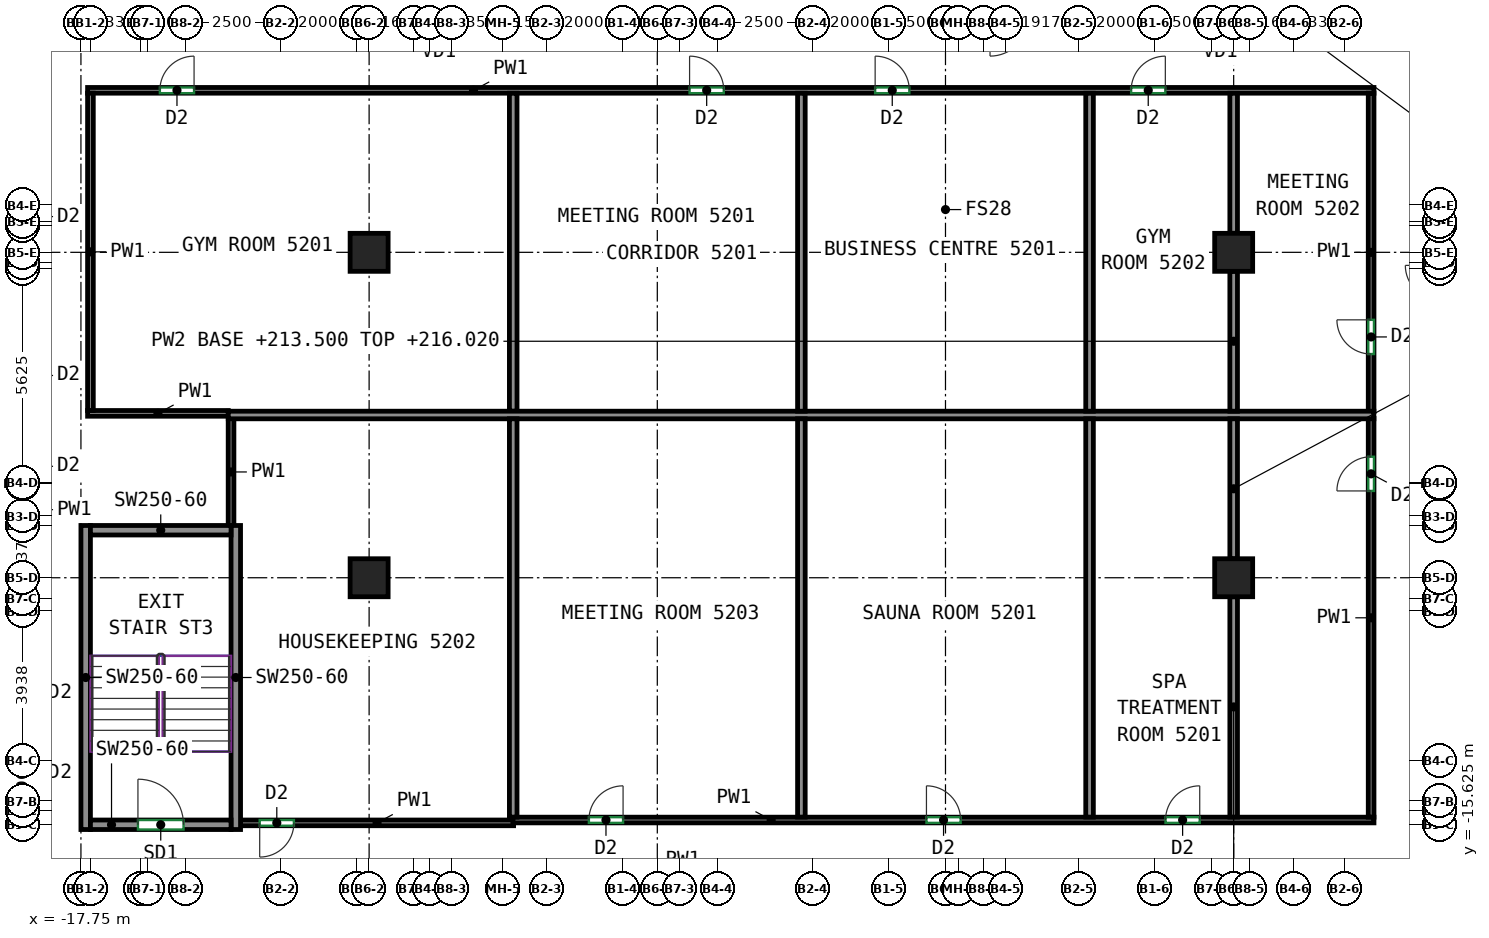
"""IFC4 building model, lengths in metres.
Left out: names, types, materials, properties, quantities, classifications, styles, units other than length and angle.
Written with IfcOpenShell. Run it as: python <this file> out.ifc"""

import sys

from ifc_helpers import new_model, si_unit, direction, frame, frame_2d, origin, origin_2d, place, context, subcontext, project, spatial, rectangle, extrude, source, transform, mapped, element, fill, save


model = new_model("IFC4")
c1 = context("Model", 3, precision=1e-05, world=origin(), true_north=direction((0.0, 1.0)))
c2 = subcontext(c1, "Body", "Model", "MODEL_VIEW")
j1 = project(units=[si_unit("LENGTHUNIT", "METRE"), si_unit("PLANEANGLEUNIT", "RADIAN")], contexts=[c1])
p1 = place(None, origin())
s1 = spatial("IfcSite", under=j1, at=p1, CompositionType="ELEMENT")
p2 = place(p1, origin())
s2 = spatial("IfcBuilding", under=s1, at=p2, CompositionType="ELEMENT")
p3 = place(p2, frame((0.0, 0.0, 213.5)))
s3 = spatial("IfcBuildingStorey", under=s2, at=p3, CompositionType="ELEMENT", Elevation=213.5)
m1 = source(origin(), c2, "Body", "SweptSolid", [
    extrude(rectangle(XDim=1.0, YDim=1.0, at=origin_2d()), origin(), (0.0, 0.0, 1.0), 3.12),
])
for number, where, z_axis, x_axis in (
    (1, (-10.167, -9.125, 0.0), (0.0, 0.0, 1.0), (1.0, 0.0, 0.0)),
    (2, (-10.167, -0.562, 0.0), (0.0, 0.0, 1.0), (1.0, 0.0, 0.0)),
    (3, (12.583, -9.125, 0.0), (0.0, 0.0, 1.0), (1.0, 0.0, 0.0)),
    (4, (12.583, -0.562, 0.0), (0.0, 0.0, 1.0), (1.0, 0.0, 0.0)),
):
    element("IfcColumn", number, at=place(p3, frame(where, z_axis=z_axis, x_axis=x_axis)), inside=s3, PredefinedType="COLUMN", context=c2, shape_type="MappedRepresentation", body=[
        mapped(m1, transform((0.0, 0.0, 0.0))),
    ])
m2 = source(origin(), c2, "Body", "SweptSolid", [
    extrude(rectangle(XDim=8.0, YDim=0.25, at=frame_2d((4.0, 0.0))), origin(), (0.0, 0.0, 1.0), 3.12),
])
for number, where, z_axis, x_axis in (
    (5, (-17.625, -15.75, 0.0), (0.0, 0.0, 1.0), (0.0, 1.0, 0.0)),
    (6, (-13.675, -15.75, 0.0), (0.0, 0.0, 1.0), (0.0, 1.0, 0.0)),
):
    element("IfcWall", number, at=place(p3, frame(where, z_axis=z_axis, x_axis=x_axis)), inside=s3, PredefinedType="SHEAR", context=c2, shape_type="MappedRepresentation", body=[
        mapped(m2, transform((0.0, 0.0, 0.0))),
    ])
m3 = source(origin(), c2, "Body", "SweptSolid", [
    extrude(rectangle(XDim=3.7, YDim=0.25, at=frame_2d((1.85, 0.0))), origin(), (0.0, 0.0, 1.0), 3.12),
])
p4 = place(p3, frame((-17.5, -15.625, 0.0), z_axis=(0.0, 0.0, 1.0), x_axis=(1.0, 0.0, 0.0)))
e7 = element("IfcWall", 7, at=p4, inside=s3, PredefinedType="SHEAR", context=c2, shape_type="MappedRepresentation", body=[
    mapped(m3, transform((0.0, 0.0, 0.0))),
])
p5 = place(p4, frame((1.25, 0.0, 0.0)))
e8 = element("IfcOpeningElement", 8, at=p5, cuts=e7, PredefinedType="OPENING", context=c2, shape_type="SweptSolid", body=[
    extrude(rectangle(XDim=1.2, YDim=2.1, at=frame_2d((0.6, 1.05))), frame((0.0, 0.135, 0.0), z_axis=(0.0, -1.0, 0.0), x_axis=(1.0, 0.0, 0.0)), (0.0, 0.0, 1.0), 0.27),
])
p6 = place(p3, frame((-17.5, -7.875, 0.0), z_axis=(0.0, 0.0, 1.0), x_axis=(1.0, 0.0, 0.0)))
e9 = element("IfcWall", 9, at=p6, inside=s3, PredefinedType="SHEAR", context=c2, shape_type="MappedRepresentation", body=[
    mapped(m3, transform((0.0, 0.0, 0.0))),
])
p7 = place(p3, frame((-17.575, -4.8, 0.0), z_axis=(0.0, 0.0, 1.0), x_axis=(1.0, 0.0, 0.0)))
e10 = element("IfcWall", 10, at=p7, inside=s3, PredefinedType="PARTITIONING", context=c2, shape_type="SweptSolid", body=[
    extrude(rectangle(XDim=3.702, YDim=0.15, at=frame_2d((1.851, 0.0))), origin(), (0.0, 0.0, 1.0), 3.12),
])
p8 = place(p3, frame((-17.575, 3.7, 0.0), z_axis=(0.0, 0.0, 1.0), x_axis=(1.0, 0.0, 0.0)))
e11 = element("IfcWall", 11, at=p8, inside=s3, PredefinedType="PARTITIONING", context=c2, shape_type="SweptSolid", body=[
    extrude(rectangle(XDim=33.85, YDim=0.15, at=frame_2d((16.925, 0.0))), origin(), (0.0, 0.0, 1.0), 3.12),
])
p9 = place(p8, frame((1.902, 0.0, 0.0)))
e12 = element("IfcOpeningElement", 12, at=p9, cuts=e11, PredefinedType="OPENING", context=c2, shape_type="SweptSolid", body=[
    extrude(rectangle(XDim=0.9, YDim=2.1, at=frame_2d((0.45, 1.05))), frame((0.0, 0.085, 0.0), z_axis=(0.0, -1.0, 0.0), x_axis=(1.0, 0.0, 0.0)), (0.0, 0.0, 1.0), 0.17),
])
p10 = place(p8, frame((15.841, 0.0, 0.0)))
e13 = element("IfcOpeningElement", 13, at=p10, cuts=e11, PredefinedType="OPENING", context=c2, shape_type="SweptSolid", body=[
    extrude(rectangle(XDim=0.9, YDim=2.1, at=frame_2d((0.45, 1.05))), frame((0.0, 0.085, 0.0), z_axis=(0.0, -1.0, 0.0), x_axis=(1.0, 0.0, 0.0)), (0.0, 0.0, 1.0), 0.17),
])
p11 = place(p8, frame((20.724, 0.0, 0.0)))
e14 = element("IfcOpeningElement", 14, at=p11, cuts=e11, PredefinedType="OPENING", context=c2, shape_type="SweptSolid", body=[
    extrude(rectangle(XDim=0.9, YDim=2.1, at=frame_2d((0.45, 1.05))), frame((0.0, 0.085, 0.0), z_axis=(0.0, -1.0, 0.0), x_axis=(1.0, 0.0, 0.0)), (0.0, 0.0, 1.0), 0.17),
])
p12 = place(p8, frame((27.46, 0.0, 0.0)))
e15 = element("IfcOpeningElement", 15, at=p12, cuts=e11, PredefinedType="OPENING", context=c2, shape_type="SweptSolid", body=[
    extrude(rectangle(XDim=0.9, YDim=2.1, at=frame_2d((0.45, 1.05))), frame((0.0, 0.085, 0.0), z_axis=(0.0, -1.0, 0.0), x_axis=(1.0, 0.0, 0.0)), (0.0, 0.0, 1.0), 0.17),
])
p13 = place(p3, frame((-17.5, -4.725, 0.0), z_axis=(0.0, 0.0, 1.0), x_axis=(0.0, 1.0, 0.0)))
e16 = element("IfcWall", 16, at=p13, inside=s3, PredefinedType="PARTITIONING", context=c2, shape_type="SweptSolid", body=[
    extrude(rectangle(XDim=8.35, YDim=0.15, at=frame_2d((4.175, 0.0))), origin(), (0.0, 0.0, 1.0), 3.12),
])
p14 = place(p3, frame((16.2, -4.753, 0.0), z_axis=(0.0, 0.0, 1.0), x_axis=(0.0, 1.0, 0.0)))
e17 = element("IfcWall", 17, at=p14, inside=s3, PredefinedType="PARTITIONING", context=c2, shape_type="SweptSolid", body=[
    extrude(rectangle(XDim=8.378, YDim=0.15, at=frame_2d((4.189, 0.0))), origin(), (0.0, 0.0, 1.0), 3.12),
])
p15 = place(p14, frame((1.514, 0.0, 0.0)))
e18 = element("IfcOpeningElement", 18, at=p15, cuts=e17, PredefinedType="OPENING", context=c2, shape_type="SweptSolid", body=[
    extrude(rectangle(XDim=0.9, YDim=2.1, at=frame_2d((0.45, 1.05))), frame((0.0, 0.085, 0.0), z_axis=(0.0, -1.0, 0.0), x_axis=(1.0, 0.0, 0.0)), (0.0, 0.0, 1.0), 0.17),
])
p16 = place(p3, frame((-13.8, -7.75, 0.0), z_axis=(0.0, 0.0, 1.0), x_axis=(0.0, 1.0, 0.0)))
e19 = element("IfcWall", 19, at=p16, inside=s3, PredefinedType="PARTITIONING", context=c2, shape_type="SweptSolid", body=[
    extrude(rectangle(XDim=2.817, YDim=0.15, at=frame_2d((1.408, 0.0))), origin(), (0.0, 0.0, 1.0), 3.12),
])
p17 = place(p3, frame((-6.365, -15.575, 0.0), z_axis=(0.0, 0.0, 1.0), x_axis=(-1.0, 0.0, 0.0)))
e20 = element("IfcWall", 20, at=p17, inside=s3, PredefinedType="PARTITIONING", context=c2, shape_type="SweptSolid", body=[
    extrude(rectangle(XDim=7.185, YDim=0.15, at=frame_2d((3.593, 0.0))), origin(), (0.0, 0.0, 1.0), 3.12),
])
p18 = place(p17, frame((5.781, 0.0, 0.0)))
e21 = element("IfcOpeningElement", 21, at=p18, cuts=e20, PredefinedType="OPENING", context=c2, shape_type="SweptSolid", body=[
    extrude(rectangle(XDim=0.9, YDim=2.1, at=frame_2d((0.45, 1.05))), frame((0.0, 0.085, 0.0), z_axis=(0.0, -1.0, 0.0), x_axis=(1.0, 0.0, 0.0)), (0.0, 0.0, 1.0), 0.17),
])
p19 = place(p3, frame((-6.385, -15.5, 0.0), z_axis=(0.0, 0.0, 1.0), x_axis=(1.0, 0.0, 0.0)))
e22 = element("IfcWall", 22, at=p19, inside=s3, PredefinedType="PARTITIONING", context=c2, shape_type="SweptSolid", body=[
    extrude(rectangle(XDim=22.66, YDim=0.15, at=frame_2d((11.33, 0.0))), origin(), (0.0, 0.0, 1.0), 3.12),
])
p20 = place(p19, frame((2.001, 0.0, 0.0)))
e23 = element("IfcOpeningElement", 23, at=p20, cuts=e22, PredefinedType="OPENING", context=c2, shape_type="SweptSolid", body=[
    extrude(rectangle(XDim=0.9, YDim=2.1, at=frame_2d((0.45, 1.05))), frame((0.0, 0.085, 0.0), z_axis=(0.0, -1.0, 0.0), x_axis=(1.0, 0.0, 0.0)), (0.0, 0.0, 1.0), 0.17),
])
p21 = place(p19, frame((10.884, 0.0, 0.0)))
e24 = element("IfcOpeningElement", 24, at=p21, cuts=e22, PredefinedType="OPENING", context=c2, shape_type="SweptSolid", body=[
    extrude(rectangle(XDim=0.9, YDim=2.1, at=frame_2d((0.45, 1.05))), frame((0.0, 0.085, 0.0), z_axis=(0.0, -1.0, 0.0), x_axis=(1.0, 0.0, 0.0)), (0.0, 0.0, 1.0), 0.17),
])
p22 = place(p19, frame((17.175, 0.0, 0.0)))
e25 = element("IfcOpeningElement", 25, at=p22, cuts=e22, PredefinedType="OPENING", context=c2, shape_type="SweptSolid", body=[
    extrude(rectangle(XDim=0.9, YDim=2.1, at=frame_2d((0.45, 1.05))), frame((0.0, 0.085, 0.0), z_axis=(0.0, -1.0, 0.0), x_axis=(1.0, 0.0, 0.0)), (0.0, 0.0, 1.0), 0.17),
])
p23 = place(p3, frame((16.2, -15.425, 0.0), z_axis=(0.0, 0.0, 1.0), x_axis=(0.0, 1.0, 0.0)))
e26 = element("IfcWall", 26, at=p23, inside=s3, PredefinedType="PARTITIONING", context=c2, shape_type="SweptSolid", body=[
    extrude(rectangle(XDim=10.492, YDim=0.15, at=frame_2d((5.246, 0.0))), origin(), (0.0, 0.0, 1.0), 3.12),
])
p24 = place(p23, frame((8.584, 0.0, 0.0)))
e27 = element("IfcOpeningElement", 27, at=p24, cuts=e26, PredefinedType="OPENING", context=c2, shape_type="SweptSolid", body=[
    extrude(rectangle(XDim=0.9, YDim=2.1, at=frame_2d((0.45, 1.05))), frame((0.0, 0.085, 0.0), z_axis=(0.0, -1.0, 0.0), x_axis=(1.0, 0.0, 0.0)), (0.0, 0.0, 1.0), 0.17),
])
p25 = place(p3, frame((-6.375, -4.743, 0.0), z_axis=(0.0, 0.0, 1.0), x_axis=(0.0, 1.0, 0.0)))
e28 = element("IfcWall", 28, at=p25, inside=s3, PredefinedType="PARTITIONING", context=c2, shape_type="SweptSolid", body=[
    extrude(rectangle(XDim=8.366, YDim=0.2, at=frame_2d((4.183, 0.0))), origin(), (0.0, 0.0, 1.0), 3.12),
])
p26 = place(p3, frame((-13.873, -4.843, 0.0), z_axis=(0.0, 0.0, 1.0), x_axis=(1.0, 0.0, 0.0)))
e29 = element("IfcWall", 29, at=p26, inside=s3, PredefinedType="PARTITIONING", context=c2, shape_type="SweptSolid", body=[
    extrude(rectangle(XDim=30.146, YDim=0.2, at=frame_2d((15.073, 0.0))), origin(), (0.0, 0.0, 1.0), 3.12),
])
for number, where, z_axis, x_axis in (
    (30, (1.208, -4.743, 0.0), (0.0, 0.0, 1.0), (0.0, 1.0, 0.0)),
    (31, (8.791, -4.743, 0.0), (0.0, 0.0, 1.0), (0.0, 1.0, 0.0)),
):
    element("IfcWall", number, at=place(p3, frame(where, z_axis=z_axis, x_axis=x_axis)), inside=s3, PredefinedType="PARTITIONING", context=c2, shape_type="SweptSolid", body=[
        extrude(rectangle(XDim=8.366, YDim=0.2, at=frame_2d((4.183, 0.0))), origin(), (0.0, 0.0, 1.0), 3.12),
    ])
p27 = place(p3, frame((12.583, -0.062, 0.0), z_axis=(0.0, 0.0, 1.0), x_axis=(0.0, 1.0, 0.0)))
e32 = element("IfcWall", 32, at=p27, inside=s3, PredefinedType="PARTITIONING", context=c2, shape_type="SweptSolid", body=[
    extrude(rectangle(XDim=3.685, YDim=0.2, at=frame_2d((1.843, 0.0))), origin(), (0.0, 0.0, 1.0), 3.12),
])
p28 = place(p3, frame((12.583, -4.743, 0.0), z_axis=(0.0, 0.0, 1.0), x_axis=(0.0, 1.0, 0.0)))
e33 = element("IfcWall", 33, at=p28, inside=s3, PredefinedType="PARTITIONING", context=c2, shape_type="SweptSolid", body=[
    extrude(rectangle(XDim=3.681, YDim=0.2, at=frame_2d((1.84, 0.0))), origin(), (0.0, 0.0, 1.0), 2.52),
])
for number, where, z_axis, x_axis in (
    (34, (-6.375, -15.423, 0.0), (0.0, 0.0, 1.0), (0.0, 1.0, 0.0)),
    (35, (1.208, -15.423, 0.0), (0.0, 0.0, 1.0), (0.0, 1.0, 0.0)),
    (36, (8.791, -15.423, 0.0), (0.0, 0.0, 1.0), (0.0, 1.0, 0.0)),
):
    element("IfcWall", number, at=place(p3, frame(where, z_axis=z_axis, x_axis=x_axis)), inside=s3, PredefinedType="PARTITIONING", context=c2, shape_type="SweptSolid", body=[
        extrude(rectangle(XDim=10.48, YDim=0.2, at=frame_2d((5.24, 0.0))), origin(), (0.0, 0.0, 1.0), 3.12),
    ])
p29 = place(p3, frame((12.583, -8.625, 0.0), z_axis=(0.0, 0.0, 1.0), x_axis=(0.0, 1.0, 0.0)))
e37 = element("IfcWall", 37, at=p29, inside=s3, PredefinedType="PARTITIONING", context=c2, shape_type="SweptSolid", body=[
    extrude(rectangle(XDim=3.682, YDim=0.2, at=frame_2d((1.841, 0.0))), origin(), (0.0, 0.0, 1.0), 2.52),
])
p30 = place(p3, frame((12.583, -15.423, 0.0), z_axis=(0.0, 0.0, 1.0), x_axis=(0.0, 1.0, 0.0)))
e38 = element("IfcWall", 38, at=p30, inside=s3, PredefinedType="PARTITIONING", context=c2, shape_type="SweptSolid", body=[
    extrude(rectangle(XDim=5.798, YDim=0.2, at=frame_2d((2.899, 0.0))), origin(), (0.0, 0.0, 1.0), 2.52),
])
p31 = place(p5, origin())
e39 = element("IfcDoor", 39, at=p31, inside=s3, OperationType="DOUBLE_DOOR_SINGLE_SWING", PredefinedType="DOOR", context=c2, shape_type="SweptSolid", body=[
    extrude(rectangle(XDim=1.2, YDim=2.1, at=frame_2d((0.6, 1.05))), frame((0.0, 0.025, 0.0), z_axis=(0.0, -1.0, 0.0), x_axis=(1.0, 0.0, 0.0)), (0.0, 0.0, 1.0), 0.05),
])
fill(e8, e39)
p32 = place(p18, origin())
e40 = element("IfcDoor", 40, at=p32, inside=s3, OperationType="SINGLE_SWING_RIGHT", PredefinedType="DOOR", context=c2, shape_type="SweptSolid", body=[
    extrude(rectangle(XDim=0.9, YDim=2.1, at=frame_2d((0.45, 1.05))), frame((0.0, 0.025, 0.0), z_axis=(0.0, -1.0, 0.0), x_axis=(1.0, 0.0, 0.0)), (0.0, 0.0, 1.0), 0.05),
])
fill(e21, e40)
p33 = place(p20, origin())
e41 = element("IfcDoor", 41, at=p33, inside=s3, OperationType="SINGLE_SWING_RIGHT", PredefinedType="DOOR", context=c2, shape_type="SweptSolid", body=[
    extrude(rectangle(XDim=0.9, YDim=2.1, at=frame_2d((0.45, 1.05))), frame((0.0, 0.025, 0.0), z_axis=(0.0, -1.0, 0.0), x_axis=(1.0, 0.0, 0.0)), (0.0, 0.0, 1.0), 0.05),
])
fill(e23, e41)
p34 = place(p21, origin())
e42 = element("IfcDoor", 42, at=p34, inside=s3, OperationType="SINGLE_SWING_LEFT", PredefinedType="DOOR", context=c2, shape_type="SweptSolid", body=[
    extrude(rectangle(XDim=0.9, YDim=2.1, at=frame_2d((0.45, 1.05))), frame((0.0, 0.025, 0.0), z_axis=(0.0, -1.0, 0.0), x_axis=(1.0, 0.0, 0.0)), (0.0, 0.0, 1.0), 0.05),
])
fill(e24, e42)
p35 = place(p22, origin())
e43 = element("IfcDoor", 43, at=p35, inside=s3, OperationType="SINGLE_SWING_RIGHT", PredefinedType="DOOR", context=c2, shape_type="SweptSolid", body=[
    extrude(rectangle(XDim=0.9, YDim=2.1, at=frame_2d((0.45, 1.05))), frame((0.0, 0.025, 0.0), z_axis=(0.0, -1.0, 0.0), x_axis=(1.0, 0.0, 0.0)), (0.0, 0.0, 1.0), 0.05),
])
fill(e25, e43)
p36 = place(p24, origin())
e44 = element("IfcDoor", 44, at=p36, inside=s3, OperationType="SINGLE_SWING_LEFT", PredefinedType="DOOR", context=c2, shape_type="SweptSolid", body=[
    extrude(rectangle(XDim=0.9, YDim=2.1, at=frame_2d((0.45, 1.05))), frame((0.0, 0.025, 0.0), z_axis=(0.0, -1.0, 0.0), x_axis=(1.0, 0.0, 0.0)), (0.0, 0.0, 1.0), 0.05),
])
fill(e27, e44)
p37 = place(p15, origin())
e45 = element("IfcDoor", 45, at=p37, inside=s3, OperationType="SINGLE_SWING_RIGHT", PredefinedType="DOOR", context=c2, shape_type="SweptSolid", body=[
    extrude(rectangle(XDim=0.9, YDim=2.1, at=frame_2d((0.45, 1.05))), frame((0.0, 0.025, 0.0), z_axis=(0.0, -1.0, 0.0), x_axis=(1.0, 0.0, 0.0)), (0.0, 0.0, 1.0), 0.05),
])
fill(e18, e45)
p38 = place(p9, origin())
e46 = element("IfcDoor", 46, at=p38, inside=s3, OperationType="SINGLE_SWING_RIGHT", PredefinedType="DOOR", context=c2, shape_type="SweptSolid", body=[
    extrude(rectangle(XDim=0.9, YDim=2.1, at=frame_2d((0.45, 1.05))), frame((0.0, 0.025, 0.0), z_axis=(0.0, -1.0, 0.0), x_axis=(1.0, 0.0, 0.0)), (0.0, 0.0, 1.0), 0.05),
])
fill(e12, e46)
p39 = place(p10, origin())
e47 = element("IfcDoor", 47, at=p39, inside=s3, OperationType="SINGLE_SWING_LEFT", PredefinedType="DOOR", context=c2, shape_type="SweptSolid", body=[
    extrude(rectangle(XDim=0.9, YDim=2.1, at=frame_2d((0.45, 1.05))), frame((0.0, 0.025, 0.0), z_axis=(0.0, -1.0, 0.0), x_axis=(1.0, 0.0, 0.0)), (0.0, 0.0, 1.0), 0.05),
])
fill(e13, e47)
p40 = place(p11, origin())
e48 = element("IfcDoor", 48, at=p40, inside=s3, OperationType="SINGLE_SWING_LEFT", PredefinedType="DOOR", context=c2, shape_type="SweptSolid", body=[
    extrude(rectangle(XDim=0.9, YDim=2.1, at=frame_2d((0.45, 1.05))), frame((0.0, 0.025, 0.0), z_axis=(0.0, -1.0, 0.0), x_axis=(1.0, 0.0, 0.0)), (0.0, 0.0, 1.0), 0.05),
])
fill(e14, e48)
p41 = place(p12, origin())
e49 = element("IfcDoor", 49, at=p41, inside=s3, OperationType="SINGLE_SWING_RIGHT", PredefinedType="DOOR", context=c2, shape_type="SweptSolid", body=[
    extrude(rectangle(XDim=0.9, YDim=2.1, at=frame_2d((0.45, 1.05))), frame((0.0, 0.025, 0.0), z_axis=(0.0, -1.0, 0.0), x_axis=(1.0, 0.0, 0.0)), (0.0, 0.0, 1.0), 0.05),
])
fill(e15, e49)
save(model, sys.argv[1])
